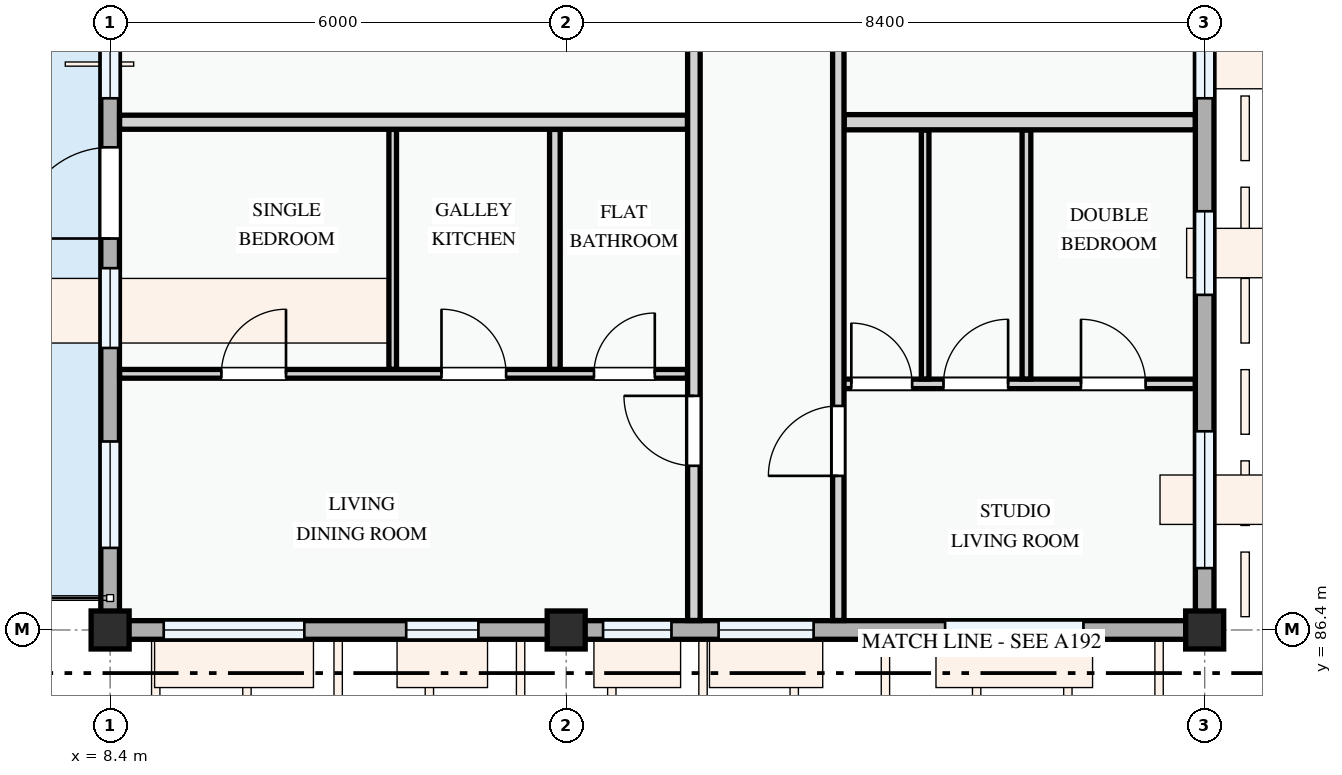
"""IFC4 building model, lengths in metres.
Left out: names, types, materials, properties, quantities, classifications, styles, units other than length and angle.
Written with IfcOpenShell. Run it as: python <this file> out.ifc"""

import sys

from ifc_helpers import new_model, si_unit, direction, frame, frame_2d, origin, origin_2d, place, context, subcontext, project, spatial, rectangle, extrude, element, fill, save


model = new_model("IFC4")
c1 = context("Model", 3, precision=1e-05, world=origin(), true_north=direction((0.0, 1.0)))
c2 = subcontext(c1, "Body", "Model", "MODEL_VIEW")
j1 = project(units=[si_unit("LENGTHUNIT", "METRE"), si_unit("PLANEANGLEUNIT", "RADIAN")], contexts=[c1])
p1 = place(None, origin())
s1 = spatial("IfcSite", under=j1, at=p1, CompositionType="ELEMENT")
p2 = place(p1, origin())
s2 = spatial("IfcBuilding", under=s1, at=p2, CompositionType="ELEMENT")
p3 = place(p2, frame((0.0, 0.0, 41.1)))
s3 = spatial("IfcBuildingStorey", under=s2, at=p3, CompositionType="ELEMENT", Elevation=41.1)
for number, where, z_axis, x_axis in (
    (1, (8.4, 86.4, 0.0), (0.0, 0.0, 1.0), (1.0, 0.0, 0.0)),
    (2, (14.4, 86.4, 0.0), (0.0, 0.0, 1.0), (1.0, 0.0, 0.0)),
    (3, (22.8, 86.4, 0.0), (0.0, 0.0, 1.0), (1.0, 0.0, 0.0)),
):
    element("IfcColumn", number, at=place(p3, frame(where, z_axis=z_axis, x_axis=x_axis)), inside=s3, PredefinedType="COLUMN", context=c2, shape_type="SweptSolid", body=[
        extrude(rectangle(XDim=0.5, YDim=0.5, at=origin_2d()), origin(), (0.0, 0.0, 1.0), 3.3),
    ])
p4 = place(p3, frame((8.4, 94.8, 0.0), z_axis=(0.0, 0.0, 1.0), x_axis=(0.0, -1.0, 0.0)))
e4 = element("IfcWall", 4, at=p4, inside=s3, PredefinedType="STANDARD", context=c2, shape_type="SweptSolid", body=[
    extrude(rectangle(XDim=8.4, YDim=0.245, at=frame_2d((4.2, 0.0))), origin(), (0.0, 0.0, 1.0), 2.345),
])
p5 = place(p4, frame((2.05, 0.0, 0.0)))
e5 = element("IfcOpeningElement", 5, at=p5, cuts=e4, PredefinedType="OPENING", context=c2, shape_type="SweptSolid", body=[
    extrude(rectangle(XDim=1.2, YDim=2.15, at=frame_2d((0.6, 1.075))), frame((0.0, 0.133, 0.0), z_axis=(0.0, -1.0, 0.0), x_axis=(1.0, 0.0, 0.0)), (0.0, 0.0, 1.0), 0.265),
])
p6 = place(p4, frame((0.505, 0.0, 0.78)))
e6 = element("IfcOpeningElement", 6, at=p6, cuts=e4, PredefinedType="OPENING", context=c2, shape_type="SweptSolid", body=[
    extrude(rectangle(XDim=0.9, YDim=1.2, at=frame_2d((0.45, 0.6))), frame((0.0, 0.133, 0.0), z_axis=(0.0, -1.0, 0.0), x_axis=(1.0, 0.0, 0.0)), (0.0, 0.0, 1.0), 0.265),
])
p7 = place(p4, frame((3.64, 0.0, 0.78)))
e7 = element("IfcOpeningElement", 7, at=p7, cuts=e4, PredefinedType="OPENING", context=c2, shape_type="SweptSolid", body=[
    extrude(rectangle(XDim=1.05, YDim=1.2, at=frame_2d((0.525, 0.6))), frame((0.0, 0.133, 0.0), z_axis=(0.0, -1.0, 0.0), x_axis=(1.0, 0.0, 0.0)), (0.0, 0.0, 1.0), 0.265),
])
p8 = place(p4, frame((5.92, 0.0, 0.78)))
e8 = element("IfcOpeningElement", 8, at=p8, cuts=e4, PredefinedType="OPENING", context=c2, shape_type="SweptSolid", body=[
    extrude(rectangle(XDim=1.4, YDim=1.45, at=frame_2d((0.7, 0.725))), frame((0.0, 0.133, 0.0), z_axis=(0.0, -1.0, 0.0), x_axis=(1.0, 0.0, 0.0)), (0.0, 0.0, 1.0), 0.265),
])
p9 = place(p3, frame((8.4, 86.4, 0.0), z_axis=(0.0, 0.0, 1.0), x_axis=(1.0, 0.0, 0.0)))
e9 = element("IfcWall", 9, at=p9, inside=s3, PredefinedType="STANDARD", context=c2, shape_type="SweptSolid", body=[
    extrude(rectangle(XDim=6.0, YDim=0.245, at=frame_2d((3.0, 0.0))), origin(), (0.0, 0.0, 1.0), 2.525),
])
p10 = place(p9, frame((0.705, 0.0, 0.78)))
e10 = element("IfcOpeningElement", 10, at=p10, cuts=e9, PredefinedType="OPENING", context=c2, shape_type="SweptSolid", body=[
    extrude(rectangle(XDim=1.85, YDim=1.6, at=frame_2d((0.925, 0.8))), frame((0.0, 0.133, 0.0), z_axis=(0.0, -1.0, 0.0), x_axis=(1.0, 0.0, 0.0)), (0.0, 0.0, 1.0), 0.265),
])
p11 = place(p9, frame((3.895, 0.0, 0.78)))
e11 = element("IfcOpeningElement", 11, at=p11, cuts=e9, PredefinedType="OPENING", context=c2, shape_type="SweptSolid", body=[
    extrude(rectangle(XDim=0.95, YDim=1.15, at=frame_2d((0.475, 0.575))), frame((0.0, 0.133, 0.0), z_axis=(0.0, -1.0, 0.0), x_axis=(1.0, 0.0, 0.0)), (0.0, 0.0, 1.0), 0.265),
])
p12 = place(p3, frame((14.4, 86.4, 0.0), z_axis=(0.0, 0.0, 1.0), x_axis=(1.0, 0.0, 0.0)))
e12 = element("IfcWall", 12, at=p12, inside=s3, PredefinedType="STANDARD", context=c2, shape_type="SweptSolid", body=[
    extrude(rectangle(XDim=8.4, YDim=0.245, at=frame_2d((4.2, 0.0))), origin(), (0.0, 0.0, 1.0), 2.375),
])
p13 = place(p12, frame((0.485, 0.0, 0.78)))
e13 = element("IfcOpeningElement", 13, at=p13, cuts=e12, PredefinedType="OPENING", context=c2, shape_type="SweptSolid", body=[
    extrude(rectangle(XDim=0.9, YDim=1.2, at=frame_2d((0.45, 0.6))), frame((0.0, 0.133, 0.0), z_axis=(0.0, -1.0, 0.0), x_axis=(1.0, 0.0, 0.0)), (0.0, 0.0, 1.0), 0.265),
])
p14 = place(p12, frame((2.005, 0.0, 0.78)))
e14 = element("IfcOpeningElement", 14, at=p14, cuts=e12, PredefinedType="OPENING", context=c2, shape_type="SweptSolid", body=[
    extrude(rectangle(XDim=1.25, YDim=1.3, at=frame_2d((0.625, 0.65))), frame((0.0, 0.133, 0.0), z_axis=(0.0, -1.0, 0.0), x_axis=(1.0, 0.0, 0.0)), (0.0, 0.0, 1.0), 0.265),
])
p15 = place(p12, frame((4.985, 0.0, 0.78)))
e15 = element("IfcOpeningElement", 15, at=p15, cuts=e12, PredefinedType="OPENING", context=c2, shape_type="SweptSolid", body=[
    extrude(rectangle(XDim=1.82, YDim=1.46, at=frame_2d((0.91, 0.73))), frame((0.0, 0.133, 0.0), z_axis=(0.0, -1.0, 0.0), x_axis=(1.0, 0.0, 0.0)), (0.0, 0.0, 1.0), 0.265),
])
p16 = place(p3, frame((22.8, 86.4, 0.0), z_axis=(0.0, 0.0, 1.0), x_axis=(0.0, 1.0, 0.0)))
e16 = element("IfcWall", 16, at=p16, inside=s3, PredefinedType="STANDARD", context=c2, shape_type="SweptSolid", body=[
    extrude(rectangle(XDim=8.4, YDim=0.245, at=frame_2d((4.2, 0.0))), origin(), (0.0, 0.0, 1.0), 2.425),
])
p17 = place(p16, frame((0.814, 0.0, 0.78)))
e17 = element("IfcOpeningElement", 17, at=p17, cuts=e16, PredefinedType="OPENING", context=c2, shape_type="SweptSolid", body=[
    extrude(rectangle(XDim=1.8, YDim=1.5, at=frame_2d((0.9, 0.75))), frame((0.0, 0.133, 0.0), z_axis=(0.0, -1.0, 0.0), x_axis=(1.0, 0.0, 0.0)), (0.0, 0.0, 1.0), 0.265),
])
p18 = place(p16, frame((4.409, 0.0, 0.78)))
e18 = element("IfcOpeningElement", 18, at=p18, cuts=e16, PredefinedType="OPENING", context=c2, shape_type="SweptSolid", body=[
    extrude(rectangle(XDim=1.1, YDim=1.3, at=frame_2d((0.55, 0.65))), frame((0.0, 0.133, 0.0), z_axis=(0.0, -1.0, 0.0), x_axis=(1.0, 0.0, 0.0)), (0.0, 0.0, 1.0), 0.265),
])
p19 = place(p16, frame((6.995, 0.0, 0.78)))
e19 = element("IfcOpeningElement", 19, at=p19, cuts=e16, PredefinedType="OPENING", context=c2, shape_type="SweptSolid", body=[
    extrude(rectangle(XDim=0.9, YDim=1.2, at=frame_2d((0.45, 0.6))), frame((0.0, 0.133, 0.0), z_axis=(0.0, -1.0, 0.0), x_axis=(1.0, 0.0, 0.0)), (0.0, 0.0, 1.0), 0.265),
])
p20 = place(p3, frame((8.524, 89.77, 0.0), z_axis=(0.0, 0.0, 1.0), x_axis=(1.0, 0.0, 0.0)))
e20 = element("IfcWall", 20, at=p20, inside=s3, PredefinedType="PARTITIONING", context=c2, shape_type="SweptSolid", body=[
    extrude(rectangle(XDim=7.471, YDim=0.115, at=frame_2d((3.736, 0.0))), origin(), (0.0, 0.0, 1.0), 3.0),
])
p21 = place(p20, frame((1.339, 0.0, 0.0)))
e21 = element("IfcOpeningElement", 21, at=p21, cuts=e20, PredefinedType="OPENING", context=c2, shape_type="SweptSolid", body=[
    extrude(rectangle(XDim=0.85, YDim=2.1, at=frame_2d((0.425, 1.05))), frame((0.0, 0.067, 0.0), z_axis=(0.0, -1.0, 0.0), x_axis=(1.0, 0.0, 0.0)), (0.0, 0.0, 1.0), 0.135),
])
p22 = place(p20, frame((4.235, 0.0, 0.0)))
e22 = element("IfcOpeningElement", 22, at=p22, cuts=e20, PredefinedType="OPENING", context=c2, shape_type="SweptSolid", body=[
    extrude(rectangle(XDim=0.85, YDim=2.1, at=frame_2d((0.425, 1.05))), frame((0.0, 0.067, 0.0), z_axis=(0.0, -1.0, 0.0), x_axis=(1.0, 0.0, 0.0)), (0.0, 0.0, 1.0), 0.135),
])
p23 = place(p20, frame((6.241, 0.0, 0.0)))
e23 = element("IfcOpeningElement", 23, at=p23, cuts=e20, PredefinedType="OPENING", context=c2, shape_type="SweptSolid", body=[
    extrude(rectangle(XDim=0.8, YDim=2.1, at=frame_2d((0.4, 1.05))), frame((0.0, 0.067, 0.0), z_axis=(0.0, -1.0, 0.0), x_axis=(1.0, 0.0, 0.0)), (0.0, 0.0, 1.0), 0.135),
])
p24 = place(p3, frame((12.118, 89.83, 0.0), z_axis=(0.0, 0.0, 1.0), x_axis=(0.0, 1.0, 0.0)))
e24 = element("IfcWall", 24, at=p24, inside=s3, PredefinedType="PARTITIONING", context=c2, shape_type="SweptSolid", body=[
    extrude(rectangle(XDim=3.156, YDim=0.1, at=frame_2d((1.578, 0.0))), origin(), (0.0, 0.0, 1.0), 3.0),
])
p25 = place(p3, frame((14.251, 89.83, 0.0), z_axis=(0.0, 0.0, 1.0), x_axis=(0.0, 1.0, 0.0)))
e25 = element("IfcWall", 25, at=p25, inside=s3, PredefinedType="PARTITIONING", context=c2, shape_type="SweptSolid", body=[
    extrude(rectangle(XDim=3.156, YDim=0.14, at=frame_2d((1.578, 0.0))), origin(), (0.0, 0.0, 1.0), 2.425),
])
p26 = place(p3, frame((17.98, 89.638, 0.0), z_axis=(0.0, 0.0, 1.0), x_axis=(1.0, 0.0, 0.0)))
e26 = element("IfcWall", 26, at=p26, inside=s3, PredefinedType="PARTITIONING", context=c2, shape_type="SweptSolid", body=[
    extrude(rectangle(XDim=4.696, YDim=0.125, at=frame_2d((2.348, 0.0))), origin(), (0.0, 0.0, 1.0), 3.0),
])
p27 = place(p26, frame((0.171, 0.0, 0.0)))
e27 = element("IfcOpeningElement", 27, at=p27, cuts=e26, PredefinedType="OPENING", context=c2, shape_type="SweptSolid", body=[
    extrude(rectangle(XDim=0.8, YDim=2.1, at=frame_2d((0.4, 1.05))), frame((0.0, 0.073, 0.0), z_axis=(0.0, -1.0, 0.0), x_axis=(1.0, 0.0, 0.0)), (0.0, 0.0, 1.0), 0.145),
])
p28 = place(p26, frame((1.384, 0.0, 0.0)))
e28 = element("IfcOpeningElement", 28, at=p28, cuts=e26, PredefinedType="OPENING", context=c2, shape_type="SweptSolid", body=[
    extrude(rectangle(XDim=0.85, YDim=2.1, at=frame_2d((0.425, 1.05))), frame((0.0, 0.073, 0.0), z_axis=(0.0, -1.0, 0.0), x_axis=(1.0, 0.0, 0.0)), (0.0, 0.0, 1.0), 0.145),
])
p29 = place(p26, frame((3.193, 0.0, 0.0)))
e29 = element("IfcOpeningElement", 29, at=p29, cuts=e26, PredefinedType="OPENING", context=c2, shape_type="SweptSolid", body=[
    extrude(rectangle(XDim=0.85, YDim=2.1, at=frame_2d((0.425, 1.05))), frame((0.0, 0.073, 0.0), z_axis=(0.0, -1.0, 0.0), x_axis=(1.0, 0.0, 0.0)), (0.0, 0.0, 1.0), 0.145),
])
p30 = place(p3, frame((20.455, 89.702, 0.0), z_axis=(0.0, 0.0, 1.0), x_axis=(0.0, 1.0, 0.0)))
e30 = element("IfcWall", 30, at=p30, inside=s3, PredefinedType="PARTITIONING", context=c2, shape_type="SweptSolid", body=[
    extrude(rectangle(XDim=3.276, YDim=0.115, at=frame_2d((1.638, 0.0))), origin(), (0.0, 0.0, 1.0), 3.0),
])
p31 = place(p3, frame((19.122, 89.702, 0.0), z_axis=(0.0, 0.0, 1.0), x_axis=(0.0, 1.0, 0.0)))
e31 = element("IfcWall", 31, at=p31, inside=s3, PredefinedType="PARTITIONING", context=c2, shape_type="SweptSolid", body=[
    extrude(rectangle(XDim=3.276, YDim=0.1, at=frame_2d((1.638, 0.0))), origin(), (0.0, 0.0, 1.0), 3.0),
])
p32 = place(p3, frame((8.524, 93.08, 0.0), z_axis=(0.0, 0.0, 1.0), x_axis=(1.0, 0.0, 0.0)))
e32 = element("IfcWall", 32, at=p32, inside=s3, PredefinedType="PARTITIONING", context=c2, shape_type="SweptSolid", body=[
    extrude(rectangle(XDim=7.471, YDim=0.185, at=frame_2d((3.736, 0.0))), origin(), (0.0, 0.0, 1.0), 3.0),
])
p33 = place(p3, frame((18.057, 93.08, 0.0), z_axis=(0.0, 0.0, 1.0), x_axis=(1.0, 0.0, 0.0)))
e33 = element("IfcWall", 33, at=p33, inside=s3, PredefinedType="PARTITIONING", context=c2, shape_type="SweptSolid", body=[
    extrude(rectangle(XDim=4.619, YDim=0.2, at=frame_2d((2.309, 0.0))), origin(), (0.0, 0.0, 1.0), 3.0),
])
p34 = place(p3, frame((16.08, 86.524, 0.0), z_axis=(0.0, 0.0, 1.0), x_axis=(0.0, 1.0, 0.0)))
e34 = element("IfcWall", 34, at=p34, inside=s3, PredefinedType="PARTITIONING", context=c2, shape_type="SweptSolid", body=[
    extrude(rectangle(XDim=22.816, YDim=0.165, at=frame_2d((11.408, 0.0))), origin(), (0.0, 0.0, 1.0), 3.0),
])
p35 = place(p34, frame((2.035, 0.0, 0.0)))
e35 = element("IfcOpeningElement", 35, at=p35, cuts=e34, PredefinedType="OPENING", context=c2, shape_type="SweptSolid", body=[
    extrude(rectangle(XDim=0.92, YDim=2.1, at=frame_2d((0.46, 1.05))), frame((0.0, 0.093, 0.0), z_axis=(0.0, -1.0, 0.0), x_axis=(1.0, 0.0, 0.0)), (0.0, 0.0, 1.0), 0.185),
])
p36 = place(p34, frame((10.071, 0.0, 0.0)))
e36 = element("IfcOpeningElement", 36, at=p36, cuts=e34, PredefinedType="OPENING", context=c2, shape_type="SweptSolid", body=[
    extrude(rectangle(XDim=0.96, YDim=2.12, at=frame_2d((0.48, 1.06))), frame((0.0, 0.093, 0.0), z_axis=(0.0, -1.0, 0.0), x_axis=(1.0, 0.0, 0.0)), (0.0, 0.0, 1.0), 0.185),
])
p37 = place(p34, frame((18.018, 0.0, 0.0)))
e37 = element("IfcOpeningElement", 37, at=p37, cuts=e34, PredefinedType="OPENING", context=c2, shape_type="SweptSolid", body=[
    extrude(rectangle(XDim=0.92, YDim=2.1, at=frame_2d((0.46, 1.05))), frame((0.0, 0.093, 0.0), z_axis=(0.0, -1.0, 0.0), x_axis=(1.0, 0.0, 0.0)), (0.0, 0.0, 1.0), 0.185),
])
p38 = place(p3, frame((17.98, 86.524, 0.0), z_axis=(0.0, 0.0, 1.0), x_axis=(0.0, 1.0, 0.0)))
e38 = element("IfcWall", 38, at=p38, inside=s3, PredefinedType="PARTITIONING", context=c2, shape_type="SweptSolid", body=[
    extrude(rectangle(XDim=22.816, YDim=0.15, at=frame_2d((11.408, 0.0))), origin(), (0.0, 0.0, 1.0), 3.0),
])
p39 = place(p38, frame((1.903, 0.0, 0.0)))
e39 = element("IfcOpeningElement", 39, at=p39, cuts=e38, PredefinedType="OPENING", context=c2, shape_type="SweptSolid", body=[
    extrude(rectangle(XDim=0.92, YDim=2.1, at=frame_2d((0.46, 1.05))), frame((0.0, 0.085, 0.0), z_axis=(0.0, -1.0, 0.0), x_axis=(1.0, 0.0, 0.0)), (0.0, 0.0, 1.0), 0.17),
])
p40 = place(p38, frame((9.882, 0.0, 0.0)))
e40 = element("IfcOpeningElement", 40, at=p40, cuts=e38, PredefinedType="OPENING", context=c2, shape_type="SweptSolid", body=[
    extrude(rectangle(XDim=0.92, YDim=2.1, at=frame_2d((0.46, 1.05))), frame((0.0, 0.085, 0.0), z_axis=(0.0, -1.0, 0.0), x_axis=(1.0, 0.0, 0.0)), (0.0, 0.0, 1.0), 0.17),
])
p41 = place(p38, frame((18.008, 0.0, 0.0)))
e41 = element("IfcOpeningElement", 41, at=p41, cuts=e38, PredefinedType="OPENING", context=c2, shape_type="SweptSolid", body=[
    extrude(rectangle(XDim=0.92, YDim=2.1, at=frame_2d((0.46, 1.05))), frame((0.0, 0.085, 0.0), z_axis=(0.0, -1.0, 0.0), x_axis=(1.0, 0.0, 0.0)), (0.0, 0.0, 1.0), 0.17),
])
p42 = place(p5, frame((1.2, 0.0, 0.0), z_axis=(0.0, 0.0, 1.0), x_axis=(-1.0, 0.0, 0.0)))
e42 = element("IfcDoor", 42, at=p42, inside=s3, OperationType="SINGLE_SWING_LEFT", PredefinedType="DOOR", context=c2, shape_type="SweptSolid", body=[
    extrude(rectangle(XDim=1.2, YDim=2.15, at=frame_2d((0.6, 1.075))), frame((0.0, 0.025, 0.0), z_axis=(0.0, -1.0, 0.0), x_axis=(1.0, 0.0, 0.0)), (0.0, 0.0, 1.0), 0.05),
])
fill(e5, e42)
p43 = place(p6, origin())
e43 = element("IfcWindow", 43, at=p43, inside=s3, PartitioningType="SINGLE_PANEL", PredefinedType="WINDOW", context=c2, shape_type="SweptSolid", body=[
    extrude(rectangle(XDim=0.9, YDim=1.2, at=frame_2d((0.45, 0.6))), frame((0.0, 0.03, 0.0), z_axis=(0.0, -1.0, 0.0), x_axis=(1.0, 0.0, 0.0)), (0.0, 0.0, 1.0), 0.06),
])
fill(e6, e43)
p44 = place(p7, origin())
e44 = element("IfcWindow", 44, at=p44, inside=s3, PartitioningType="SINGLE_PANEL", PredefinedType="WINDOW", context=c2, shape_type="SweptSolid", body=[
    extrude(rectangle(XDim=1.05, YDim=1.2, at=frame_2d((0.525, 0.6))), frame((0.0, 0.03, 0.0), z_axis=(0.0, -1.0, 0.0), x_axis=(1.0, 0.0, 0.0)), (0.0, 0.0, 1.0), 0.06),
])
fill(e7, e44)
p45 = place(p8, origin())
e45 = element("IfcWindow", 45, at=p45, inside=s3, PartitioningType="SINGLE_PANEL", PredefinedType="WINDOW", context=c2, shape_type="SweptSolid", body=[
    extrude(rectangle(XDim=1.4, YDim=1.45, at=frame_2d((0.7, 0.725))), frame((0.0, 0.03, 0.0), z_axis=(0.0, -1.0, 0.0), x_axis=(1.0, 0.0, 0.0)), (0.0, 0.0, 1.0), 0.06),
])
fill(e8, e45)
p46 = place(p10, origin())
e46 = element("IfcWindow", 46, at=p46, inside=s3, PartitioningType="DOUBLE_PANEL_VERTICAL", PredefinedType="WINDOW", context=c2, shape_type="SweptSolid", body=[
    extrude(rectangle(XDim=1.85, YDim=1.6, at=frame_2d((0.925, 0.8))), frame((0.0, 0.03, 0.0), z_axis=(0.0, -1.0, 0.0), x_axis=(1.0, 0.0, 0.0)), (0.0, 0.0, 1.0), 0.06),
])
fill(e10, e46)
p47 = place(p11, origin())
e47 = element("IfcWindow", 47, at=p47, inside=s3, PartitioningType="SINGLE_PANEL", PredefinedType="WINDOW", context=c2, shape_type="SweptSolid", body=[
    extrude(rectangle(XDim=0.95, YDim=1.15, at=frame_2d((0.475, 0.575))), frame((0.0, 0.03, 0.0), z_axis=(0.0, -1.0, 0.0), x_axis=(1.0, 0.0, 0.0)), (0.0, 0.0, 1.0), 0.06),
])
fill(e11, e47)
p48 = place(p13, origin())
e48 = element("IfcWindow", 48, at=p48, inside=s3, PartitioningType="SINGLE_PANEL", PredefinedType="WINDOW", context=c2, shape_type="SweptSolid", body=[
    extrude(rectangle(XDim=0.9, YDim=1.2, at=frame_2d((0.45, 0.6))), frame((0.0, 0.03, 0.0), z_axis=(0.0, -1.0, 0.0), x_axis=(1.0, 0.0, 0.0)), (0.0, 0.0, 1.0), 0.06),
])
fill(e13, e48)
p49 = place(p14, origin())
e49 = element("IfcWindow", 49, at=p49, inside=s3, PartitioningType="SINGLE_PANEL", PredefinedType="WINDOW", context=c2, shape_type="SweptSolid", body=[
    extrude(rectangle(XDim=1.25, YDim=1.3, at=frame_2d((0.625, 0.65))), frame((0.0, 0.03, 0.0), z_axis=(0.0, -1.0, 0.0), x_axis=(1.0, 0.0, 0.0)), (0.0, 0.0, 1.0), 0.06),
])
fill(e14, e49)
p50 = place(p15, origin())
e50 = element("IfcWindow", 50, at=p50, inside=s3, PartitioningType="DOUBLE_PANEL_VERTICAL", PredefinedType="WINDOW", context=c2, shape_type="SweptSolid", body=[
    extrude(rectangle(XDim=1.82, YDim=1.46, at=frame_2d((0.91, 0.73))), frame((0.0, 0.03, 0.0), z_axis=(0.0, -1.0, 0.0), x_axis=(1.0, 0.0, 0.0)), (0.0, 0.0, 1.0), 0.06),
])
fill(e15, e50)
p51 = place(p17, origin())
e51 = element("IfcWindow", 51, at=p51, inside=s3, PartitioningType="DOUBLE_PANEL_VERTICAL", PredefinedType="WINDOW", context=c2, shape_type="SweptSolid", body=[
    extrude(rectangle(XDim=1.8, YDim=1.5, at=frame_2d((0.9, 0.75))), frame((0.0, 0.03, 0.0), z_axis=(0.0, -1.0, 0.0), x_axis=(1.0, 0.0, 0.0)), (0.0, 0.0, 1.0), 0.06),
])
fill(e17, e51)
p52 = place(p18, origin())
e52 = element("IfcWindow", 52, at=p52, inside=s3, PartitioningType="SINGLE_PANEL", PredefinedType="WINDOW", context=c2, shape_type="SweptSolid", body=[
    extrude(rectangle(XDim=1.1, YDim=1.3, at=frame_2d((0.55, 0.65))), frame((0.0, 0.03, 0.0), z_axis=(0.0, -1.0, 0.0), x_axis=(1.0, 0.0, 0.0)), (0.0, 0.0, 1.0), 0.06),
])
fill(e18, e52)
p53 = place(p19, origin())
e53 = element("IfcWindow", 53, at=p53, inside=s3, PartitioningType="SINGLE_PANEL", PredefinedType="WINDOW", context=c2, shape_type="SweptSolid", body=[
    extrude(rectangle(XDim=0.9, YDim=1.2, at=frame_2d((0.45, 0.6))), frame((0.0, 0.03, 0.0), z_axis=(0.0, -1.0, 0.0), x_axis=(1.0, 0.0, 0.0)), (0.0, 0.0, 1.0), 0.06),
])
fill(e19, e53)
p54 = place(p21, origin())
e54 = element("IfcDoor", 54, at=p54, inside=s3, OperationType="SINGLE_SWING_RIGHT", PredefinedType="DOOR", context=c2, shape_type="SweptSolid", body=[
    extrude(rectangle(XDim=0.85, YDim=2.1, at=frame_2d((0.425, 1.05))), frame((0.0, 0.025, 0.0), z_axis=(0.0, -1.0, 0.0), x_axis=(1.0, 0.0, 0.0)), (0.0, 0.0, 1.0), 0.05),
])
fill(e21, e54)
p55 = place(p22, origin())
e55 = element("IfcDoor", 55, at=p55, inside=s3, OperationType="SINGLE_SWING_LEFT", PredefinedType="DOOR", context=c2, shape_type="SweptSolid", body=[
    extrude(rectangle(XDim=0.85, YDim=2.1, at=frame_2d((0.425, 1.05))), frame((0.0, 0.025, 0.0), z_axis=(0.0, -1.0, 0.0), x_axis=(1.0, 0.0, 0.0)), (0.0, 0.0, 1.0), 0.05),
])
fill(e22, e55)
p56 = place(p23, origin())
e56 = element("IfcDoor", 56, at=p56, inside=s3, OperationType="SINGLE_SWING_RIGHT", PredefinedType="DOOR", context=c2, shape_type="SweptSolid", body=[
    extrude(rectangle(XDim=0.8, YDim=2.1, at=frame_2d((0.4, 1.05))), frame((0.0, 0.025, 0.0), z_axis=(0.0, -1.0, 0.0), x_axis=(1.0, 0.0, 0.0)), (0.0, 0.0, 1.0), 0.05),
])
fill(e23, e56)
p57 = place(p27, origin())
e57 = element("IfcDoor", 57, at=p57, inside=s3, OperationType="SINGLE_SWING_LEFT", PredefinedType="DOOR", context=c2, shape_type="SweptSolid", body=[
    extrude(rectangle(XDim=0.8, YDim=2.1, at=frame_2d((0.4, 1.05))), frame((0.0, 0.025, 0.0), z_axis=(0.0, -1.0, 0.0), x_axis=(1.0, 0.0, 0.0)), (0.0, 0.0, 1.0), 0.05),
])
fill(e27, e57)
p58 = place(p28, origin())
e58 = element("IfcDoor", 58, at=p58, inside=s3, OperationType="SINGLE_SWING_RIGHT", PredefinedType="DOOR", context=c2, shape_type="SweptSolid", body=[
    extrude(rectangle(XDim=0.85, YDim=2.1, at=frame_2d((0.425, 1.05))), frame((0.0, 0.025, 0.0), z_axis=(0.0, -1.0, 0.0), x_axis=(1.0, 0.0, 0.0)), (0.0, 0.0, 1.0), 0.05),
])
fill(e28, e58)
p59 = place(p29, origin())
e59 = element("IfcDoor", 59, at=p59, inside=s3, OperationType="SINGLE_SWING_LEFT", PredefinedType="DOOR", context=c2, shape_type="SweptSolid", body=[
    extrude(rectangle(XDim=0.85, YDim=2.1, at=frame_2d((0.425, 1.05))), frame((0.0, 0.025, 0.0), z_axis=(0.0, -1.0, 0.0), x_axis=(1.0, 0.0, 0.0)), (0.0, 0.0, 1.0), 0.05),
])
fill(e29, e59)
p60 = place(p35, origin())
e60 = element("IfcDoor", 60, at=p60, inside=s3, OperationType="SINGLE_SWING_RIGHT", PredefinedType="DOOR", context=c2, shape_type="SweptSolid", body=[
    extrude(rectangle(XDim=0.92, YDim=2.1, at=frame_2d((0.46, 1.05))), frame((0.0, 0.025, 0.0), z_axis=(0.0, -1.0, 0.0), x_axis=(1.0, 0.0, 0.0)), (0.0, 0.0, 1.0), 0.05),
])
fill(e35, e60)
p61 = place(p39, origin())
e61 = element("IfcDoor", 61, at=p61, inside=s3, OperationType="SINGLE_SWING_LEFT", PredefinedType="DOOR", context=c2, shape_type="SweptSolid", body=[
    extrude(rectangle(XDim=0.92, YDim=2.1, at=frame_2d((0.46, 1.05))), frame((0.0, 0.025, 0.0), z_axis=(0.0, -1.0, 0.0), x_axis=(1.0, 0.0, 0.0)), (0.0, 0.0, 1.0), 0.05),
])
fill(e39, e61)
save(model, sys.argv[1])
